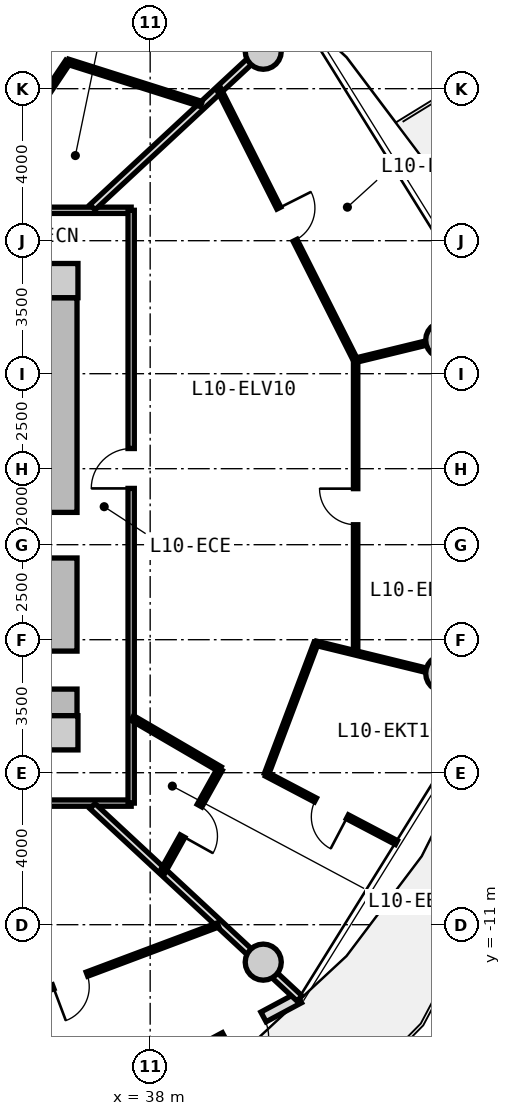
"""IFC4 building model, lengths in metres.
Left out: names, types, materials, properties, quantities, classifications, styles, units other than length and angle.
Written with IfcOpenShell. Run it as: python <this file> out.ifc"""

import sys

from ifc_helpers import new_model, si_unit, direction, frame, frame_2d, origin, origin_2d, place, context, subcontext, project, spatial, rectangle, circle, extrude, source, transform, mapped, element, fill, save


model = new_model("IFC4")
c1 = context("Model", 3, precision=1e-05, world=origin(), true_north=direction((0.0, 1.0)))
c2 = subcontext(c1, "Body", "Model", "MODEL_VIEW")
j1 = project(units=[si_unit("LENGTHUNIT", "METRE"), si_unit("PLANEANGLEUNIT", "RADIAN")], contexts=[c1])
p1 = place(None, origin())
s1 = spatial("IfcSite", under=j1, at=p1, CompositionType="ELEMENT")
p2 = place(p1, origin())
s2 = spatial("IfcBuilding", under=s1, at=p2, CompositionType="ELEMENT")
p3 = place(p2, frame((0.0, 0.0, 36.85)))
s3 = spatial("IfcBuildingStorey", under=s2, at=p3, CompositionType="ELEMENT", Elevation=36.85)
m1 = source(origin(), c2, "Body", "SweptSolid", [
    extrude(rectangle(XDim=0.9, YDim=0.9, at=origin_2d()), origin(), (0.0, 0.0, 1.0), 3.05),
])
for number, where, z_axis, x_axis in (
    (1, (35.65, -5.95, 0.0), (0.0, 0.0, 1.0), (1.0, 0.0, 0.0)),
    (2, (35.65, 5.95, 0.0), (0.0, 0.0, 1.0), (1.0, 0.0, 0.0)),
):
    element("IfcColumn", number, at=place(p3, frame(where, z_axis=z_axis, x_axis=x_axis)), inside=s3, PredefinedType="COLUMN", context=c2, shape_type="MappedRepresentation", body=[
        mapped(m1, transform((0.0, 0.0, 0.0), x_axis=(1.0, 0.0, 0.0), y_axis=(0.0, 1.0, 0.0), z_axis=(0.0, 0.0, 1.0), scale=1.0)),
    ])
m2 = source(origin(), c2, "Body", "SweptSolid", [
    extrude(rectangle(XDim=11.0, YDim=0.85, at=frame_2d((5.5, 0.0))), origin(), (0.0, 0.0, 1.0), 2.79),
])
p4 = place(p3, frame((35.65, 5.5, 0.0), z_axis=(0.0, 0.0, 1.0), x_axis=(0.0, -1.0, 0.0)))
e3 = element("IfcWall", 3, at=p4, inside=s3, PredefinedType="SHEAR", context=c2, shape_type="MappedRepresentation", body=[
    mapped(m2, transform((0.0, 0.0, 0.0), x_axis=(1.0, 0.0, 0.0), y_axis=(0.0, 1.0, 0.0), z_axis=(0.0, 0.0, 1.0), scale=1.0)),
])
p5 = place(p4, frame((5.65, 0.0, 0.0)))
e4 = element("IfcOpeningElement", 4, at=p5, cuts=e3, PredefinedType="OPENING", context=c2, shape_type="SweptSolid", body=[
    extrude(rectangle(XDim=1.2, YDim=2.15, at=frame_2d((0.6, 1.075))), frame((0.0, 0.435, 0.0), z_axis=(0.0, -1.0, 0.0), x_axis=(1.0, 0.0, 0.0)), (0.0, 0.0, 1.0), 0.87),
])
p6 = place(p4, frame((9.3, 0.0, 0.0)))
e5 = element("IfcOpeningElement", 5, at=p6, cuts=e3, PredefinedType="OPENING", context=c2, shape_type="SweptSolid", body=[
    extrude(rectangle(XDim=1.0, YDim=2.1, at=frame_2d((0.5, 1.05))), frame((0.0, 0.435, 0.0), z_axis=(0.0, -1.0, 0.0), x_axis=(1.0, 0.0, 0.0)), (0.0, 0.0, 1.0), 0.87),
])
m3 = source(origin(), c2, "Body", "SweptSolid", [
    extrude(circle(Radius=0.475, at=origin_2d()), origin(), (0.0, 0.0, 1.0), 3.05),
])
for number, where, z_axis, x_axis in (
    (6, (45.725, 4.387, 0.0), (0.0, 0.0, 1.0), (1.0, 0.0, 0.0)),
    (7, (40.975, 11.985, 0.0), (0.0, 0.0, 1.0), (1.0, 0.0, 0.0)),
    (8, (40.975, -11.985, 0.0), (0.0, 0.0, 1.0), (1.0, 0.0, 0.0)),
    (9, (45.725, -4.387, 0.0), (0.0, 0.0, 1.0), (1.0, 0.0, 0.0)),
):
    element("IfcColumn", number, at=place(p3, frame(where, z_axis=z_axis, x_axis=x_axis)), inside=s3, PredefinedType="COLUMN", context=c2, shape_type="MappedRepresentation", body=[
        mapped(m3, transform((0.0, 0.0, 0.0), x_axis=(1.0, 0.0, 0.0), y_axis=(0.0, 1.0, 0.0), z_axis=(0.0, 0.0, 1.0), scale=1.0)),
    ])
m4 = source(origin(), c2, "Body", "SweptSolid", [
    extrude(rectangle(XDim=10.011, YDim=0.29, at=frame_2d((5.005, 0.0))), origin(), (0.0, 0.0, 1.0), 2.79),
])
p7 = place(p3, frame((41.916, -12.926, 0.0), z_axis=(0.0, 0.0, 1.0), x_axis=(-0.881272505317, -0.472608475773, 0.0)))
e10 = element("IfcWall", 10, at=p7, inside=s3, PredefinedType="SOLIDWALL", context=c2, shape_type="MappedRepresentation", body=[
    mapped(m4, transform((0.0, 0.0, 0.0), x_axis=(1.0, 0.0, 0.0), y_axis=(0.0, 1.0, 0.0), z_axis=(0.0, 0.0, 1.0), scale=1.0)),
])
p8 = place(p7, frame((1.06, 0.0, 0.0)))
e11 = element("IfcOpeningElement", 11, at=p8, cuts=e10, PredefinedType="OPENING", context=c2, shape_type="SweptSolid", body=[
    extrude(rectangle(XDim=1.15, YDim=2.25, at=frame_2d((0.575, 1.125))), frame((0.0, 0.155, 0.0), z_axis=(0.0, -1.0, 0.0), x_axis=(1.0, 0.0, 0.0)), (0.0, 0.0, 1.0), 0.31),
])
p9 = place(p7, frame((5.355, 0.0, 0.85)))
e12 = element("IfcOpeningElement", 12, at=p9, cuts=e10, PredefinedType="OPENING", context=c2, shape_type="SweptSolid", body=[
    extrude(rectangle(XDim=1.2, YDim=1.5, at=frame_2d((0.6, 0.75))), frame((0.0, 0.155, 0.0), z_axis=(0.0, -1.0, 0.0), x_axis=(1.0, 0.0, 0.0)), (0.0, 0.0, 1.0), 0.31),
])
m5 = source(origin(), c2, "Body", "SweptSolid", [
    extrude(rectangle(XDim=19.0, YDim=0.165, at=frame_2d((9.5, 0.0))), origin(), (0.0, 0.0, 1.0), 2.775),
])
p10 = place(p3, frame((18.5, 7.8, 0.0), z_axis=(0.0, 0.0, 1.0), x_axis=(1.0, 0.0, 0.0)))
e13 = element("IfcWall", 13, at=p10, inside=s3, PredefinedType="PARTITIONING", context=c2, shape_type="MappedRepresentation", body=[
    mapped(m5, transform((0.0, 0.0, 0.0), x_axis=(1.0, 0.0, 0.0), y_axis=(0.0, 1.0, 0.0), z_axis=(0.0, 0.0, 1.0), scale=1.0)),
])
p11 = place(p10, frame((10.523, 0.0, 0.0)))
e14 = element("IfcOpeningElement", 14, at=p11, cuts=e13, PredefinedType="OPENING", context=c2, shape_type="SweptSolid", body=[
    extrude(rectangle(XDim=0.92, YDim=2.1, at=frame_2d((0.46, 1.05))), frame((0.0, 0.093, 0.0), z_axis=(0.0, -1.0, 0.0), x_axis=(1.0, 0.0, 0.0)), (0.0, 0.0, 1.0), 0.185),
])
p12 = place(p10, frame((8.226, 0.0, 0.0)))
e15 = element("IfcOpeningElement", 15, at=p12, cuts=e13, PredefinedType="OPENING", context=c2, shape_type="SweptSolid", body=[
    extrude(rectangle(XDim=0.92, YDim=2.1, at=frame_2d((0.46, 1.05))), frame((0.0, 0.093, 0.0), z_axis=(0.0, -1.0, 0.0), x_axis=(1.0, 0.0, 0.0)), (0.0, 0.0, 1.0), 0.185),
])
p13 = place(p10, frame((3.506, 0.0, 0.0)))
e16 = element("IfcOpeningElement", 16, at=p13, cuts=e13, PredefinedType="OPENING", context=c2, shape_type="SweptSolid", body=[
    extrude(rectangle(XDim=1.25, YDim=2.2, at=frame_2d((0.625, 1.1))), frame((0.0, 0.093, 0.0), z_axis=(0.0, -1.0, 0.0), x_axis=(1.0, 0.0, 0.0)), (0.0, 0.0, 1.0), 0.185),
])
p14 = place(p10, frame((12.706, 0.0, 0.0)))
e17 = element("IfcOpeningElement", 17, at=p14, cuts=e13, PredefinedType="OPENING", context=c2, shape_type="SweptSolid", body=[
    extrude(rectangle(XDim=1.05, YDim=2.15, at=frame_2d((0.525, 1.075))), frame((0.0, 0.093, 0.0), z_axis=(0.0, -1.0, 0.0), x_axis=(1.0, 0.0, 0.0)), (0.0, 0.0, 1.0), 0.185),
])
p15 = place(p3, frame((37.5, -7.8, 0.0), z_axis=(0.0, 0.0, 1.0), x_axis=(-1.0, 0.0, 0.0)))
e18 = element("IfcWall", 18, at=p15, inside=s3, PredefinedType="PARTITIONING", context=c2, shape_type="MappedRepresentation", body=[
    mapped(m5, transform((0.0, 0.0, 0.0), x_axis=(1.0, 0.0, 0.0), y_axis=(0.0, 1.0, 0.0), z_axis=(0.0, 0.0, 1.0), scale=1.0)),
])
p16 = place(p15, frame((7.336, 0.0, 0.0)))
e19 = element("IfcOpeningElement", 19, at=p16, cuts=e18, PredefinedType="OPENING", context=c2, shape_type="SweptSolid", body=[
    extrude(rectangle(XDim=1.05, YDim=2.15, at=frame_2d((0.525, 1.075))), frame((0.0, 0.093, 0.0), z_axis=(0.0, -1.0, 0.0), x_axis=(1.0, 0.0, 0.0)), (0.0, 0.0, 1.0), 0.185),
])
m6 = source(origin(), c2, "Body", "SweptSolid", [
    extrude(rectangle(XDim=15.6, YDim=0.165, at=frame_2d((7.8, 0.0))), origin(), (0.0, 0.0, 1.0), 2.775),
])
p17 = place(p3, frame((37.5, 7.8, 0.0), z_axis=(0.0, 0.0, 1.0), x_axis=(0.0, -1.0, 0.0)))
e20 = element("IfcWall", 20, at=p17, inside=s3, PredefinedType="PARTITIONING", context=c2, shape_type="MappedRepresentation", body=[
    mapped(m6, transform((0.0, 0.0, 0.0), x_axis=(1.0, 0.0, 0.0), y_axis=(0.0, 1.0, 0.0), z_axis=(0.0, 0.0, 1.0), scale=1.0)),
])
p18 = place(p17, frame((6.269, 0.0, 0.0)))
e21 = element("IfcOpeningElement", 21, at=p18, cuts=e20, PredefinedType="OPENING", context=c2, shape_type="SweptSolid", body=[
    extrude(rectangle(XDim=1.05, YDim=2.15, at=frame_2d((0.525, 1.075))), frame((0.0, 0.093, 0.0), z_axis=(0.0, -1.0, 0.0), x_axis=(1.0, 0.0, 0.0)), (0.0, 0.0, 1.0), 0.185),
])
m7 = source(origin(), c2, "Body", "SweptSolid", [
    extrude(rectangle(XDim=7.435, YDim=0.19, at=frame_2d((3.717, 0.0))), origin(), (0.0, 0.0, 1.0), 2.225),
])
p19 = place(p3, frame((36.483, -7.88, 0.0), z_axis=(0.0, 0.0, 1.0), x_axis=(0.732651956848, -0.680603489652, 0.0)))
e22 = element("IfcWall", 22, at=p19, inside=s3, PredefinedType="PARTITIONING", context=c2, shape_type="MappedRepresentation", body=[
    mapped(m7, transform((0.0, 0.0, 0.0), x_axis=(1.0, 0.0, 0.0), y_axis=(0.0, 1.0, 0.0), z_axis=(0.0, 0.0, 1.0), scale=1.0)),
])
m8 = source(origin(), c2, "Body", "SweptSolid", [
    extrude(rectangle(XDim=8.32, YDim=0.115, at=frame_2d((4.16, 0.0))), origin(), (0.0, 0.0, 1.0), 2.775),
])
p20 = place(p3, frame((31.997, -13.93, 0.0), z_axis=(0.0, 0.0, 1.0), x_axis=(0.936180763098, 0.351518959382, 0.0)))
e23 = element("IfcWall", 23, at=p20, inside=s3, PredefinedType="PARTITIONING", context=c2, shape_type="MappedRepresentation", body=[
    mapped(m8, transform((0.0, 0.0, 0.0), x_axis=(1.0, 0.0, 0.0), y_axis=(0.0, 1.0, 0.0), z_axis=(0.0, 0.0, 1.0), scale=1.0)),
])
p21 = place(p20, frame((3.685, 0.0, 0.0)))
e24 = element("IfcOpeningElement", 24, at=p21, cuts=e23, PredefinedType="OPENING", context=c2, shape_type="SweptSolid", body=[
    extrude(rectangle(XDim=0.95, YDim=2.1, at=frame_2d((0.475, 1.05))), frame((0.0, 0.067, 0.0), z_axis=(0.0, -1.0, 0.0), x_axis=(1.0, 0.0, 0.0)), (0.0, 0.0, 1.0), 0.135),
])
p22 = place(p3, frame((36.483, 7.88, 0.0), z_axis=(0.0, 0.0, 1.0), x_axis=(0.732651956848, 0.680603489652, 0.0)))
e25 = element("IfcWall", 25, at=p22, inside=s3, PredefinedType="PARTITIONING", context=c2, shape_type="MappedRepresentation", body=[
    mapped(m7, transform((0.0, 0.0, 0.0), x_axis=(1.0, 0.0, 0.0), y_axis=(0.0, 1.0, 0.0), z_axis=(0.0, 0.0, 1.0), scale=1.0)),
])
m9 = source(origin(), c2, "Body", "SweptSolid", [
    extrude(rectangle(XDim=7.709, YDim=0.115, at=frame_2d((3.855, 0.0))), origin(), (0.0, 0.0, 1.0), 2.775),
])
p23 = place(p3, frame((43.406, -3.855, 0.0), z_axis=(0.0, 0.0, 1.0), x_axis=(0.0, 1.0, 0.0)))
e26 = element("IfcWall", 26, at=p23, inside=s3, PredefinedType="PARTITIONING", context=c2, shape_type="MappedRepresentation", body=[
    mapped(m9, transform((0.0, 0.0, 0.0), x_axis=(1.0, 0.0, 0.0), y_axis=(0.0, 1.0, 0.0), z_axis=(0.0, 0.0, 1.0), scale=1.0)),
])
p24 = place(p23, frame((3.38, 0.0, 0.0)))
e27 = element("IfcOpeningElement", 27, at=p24, cuts=e26, PredefinedType="OPENING", context=c2, shape_type="SweptSolid", body=[
    extrude(rectangle(XDim=0.95, YDim=2.1, at=frame_2d((0.475, 1.05))), frame((0.0, 0.067, 0.0), z_axis=(0.0, -1.0, 0.0), x_axis=(1.0, 0.0, 0.0)), (0.0, 0.0, 1.0), 0.135),
])
m10 = source(origin(), c2, "Body", "SweptSolid", [
    extrude(rectangle(XDim=4.803, YDim=0.115, at=frame_2d((2.401, 0.0))), origin(), (0.0, 0.0, 1.0), 2.225),
])
p25 = place(p3, frame((42.364, -3.594, 0.0), z_axis=(0.0, 0.0, 1.0), x_axis=(0.97129155908, -0.237892217736, 0.0)))
e28 = element("IfcWall", 28, at=p25, inside=s3, PredefinedType="PARTITIONING", context=c2, shape_type="MappedRepresentation", body=[
    mapped(m10, transform((0.0, 0.0, 0.0), x_axis=(1.0, 0.0, 0.0), y_axis=(0.0, 1.0, 0.0), z_axis=(0.0, 0.0, 1.0), scale=1.0)),
])
m11 = source(origin(), c2, "Body", "SweptSolid", [
    extrude(rectangle(XDim=8.018, YDim=0.115, at=frame_2d((4.009, 0.0))), origin(), (0.0, 0.0, 1.0), 2.775),
])
p26 = place(p3, frame((43.404, 3.854, 0.0), z_axis=(0.0, 0.0, 1.0), x_axis=(-0.450134355233, 0.89296084026, 0.0)))
e29 = element("IfcWall", 29, at=p26, inside=s3, PredefinedType="PARTITIONING", context=c2, shape_type="MappedRepresentation", body=[
    mapped(m11, transform((0.0, 0.0, 0.0), x_axis=(1.0, 0.0, 0.0), y_axis=(0.0, 1.0, 0.0), z_axis=(0.0, 0.0, 1.0), scale=1.0)),
])
p27 = place(p26, frame((3.534, 0.0, 0.0)))
e30 = element("IfcOpeningElement", 30, at=p27, cuts=e29, PredefinedType="OPENING", context=c2, shape_type="SweptSolid", body=[
    extrude(rectangle(XDim=0.95, YDim=2.1, at=frame_2d((0.475, 1.05))), frame((0.0, 0.067, 0.0), z_axis=(0.0, -1.0, 0.0), x_axis=(1.0, 0.0, 0.0)), (0.0, 0.0, 1.0), 0.135),
])
m12 = source(origin(), c2, "Body", "SweptSolid", [
    extrude(rectangle(XDim=3.73, YDim=0.115, at=frame_2d((1.865, 0.0))), origin(), (0.0, 0.0, 1.0), 2.225),
])
p28 = place(p3, frame((43.404, 3.854, 0.0), z_axis=(0.0, 0.0, 1.0), x_axis=(0.971644038568, 0.236448434791, 0.0)))
e31 = element("IfcWall", 31, at=p28, inside=s3, PredefinedType="PARTITIONING", context=c2, shape_type="MappedRepresentation", body=[
    mapped(m12, transform((0.0, 0.0, 0.0), x_axis=(1.0, 0.0, 0.0), y_axis=(0.0, 1.0, 0.0), z_axis=(0.0, 0.0, 1.0), scale=1.0)),
])
m13 = source(origin(), c2, "Body", "SweptSolid", [
    extrude(rectangle(XDim=2.669, YDim=0.14, at=frame_2d((1.335, 0.0))), origin(), (0.0, 0.0, 1.0), 2.775),
])
p29 = place(p3, frame((37.53, -5.561, 0.0), z_axis=(0.0, 0.0, 1.0), x_axis=(0.86369928178, -0.50400749067, 0.0)))
e32 = element("IfcWall", 32, at=p29, inside=s3, PredefinedType="PARTITIONING", context=c2, shape_type="MappedRepresentation", body=[
    mapped(m13, transform((0.0, 0.0, 0.0), x_axis=(1.0, 0.0, 0.0), y_axis=(0.0, 1.0, 0.0), z_axis=(0.0, 0.0, 1.0), scale=1.0)),
])
m14 = source(origin(), c2, "Body", "SweptSolid", [
    extrude(rectangle(XDim=3.121, YDim=0.14, at=frame_2d((1.561, 0.0))), origin(), (0.0, 0.0, 1.0), 2.775),
])
p30 = place(p3, frame((39.836, -6.906, 0.0), z_axis=(0.0, 0.0, 1.0), x_axis=(-0.487302357327, -0.873233309342, 0.0)))
e33 = element("IfcWall", 33, at=p30, inside=s3, PredefinedType="PARTITIONING", context=c2, shape_type="MappedRepresentation", body=[
    mapped(m14, transform((0.0, 0.0, 0.0), x_axis=(1.0, 0.0, 0.0), y_axis=(0.0, 1.0, 0.0), z_axis=(0.0, 0.0, 1.0), scale=1.0)),
])
p31 = place(p30, frame((1.101, 0.0, 0.0)))
e34 = element("IfcOpeningElement", 34, at=p31, cuts=e33, PredefinedType="OPENING", context=c2, shape_type="SweptSolid", body=[
    extrude(rectangle(XDim=0.92, YDim=2.1, at=frame_2d((0.46, 1.05))), frame((0.0, 0.08, 0.0), z_axis=(0.0, -1.0, 0.0), x_axis=(1.0, 0.0, 0.0)), (0.0, 0.0, 1.0), 0.16),
])
m15 = source(origin(), c2, "Body", "SweptSolid", [
    extrude(rectangle(XDim=3.864, YDim=0.115, at=frame_2d((1.932, 0.0))), origin(), (0.0, 0.0, 1.0), 2.775),
])
p32 = place(p3, frame((41.06, -7.041, 0.0), z_axis=(0.0, 0.0, 1.0), x_axis=(0.885194959803, -0.465220252289, 0.0)))
e35 = element("IfcWall", 35, at=p32, inside=s3, PredefinedType="PARTITIONING", context=c2, shape_type="MappedRepresentation", body=[
    mapped(m15, transform((0.0, 0.0, 0.0), x_axis=(1.0, 0.0, 0.0), y_axis=(0.0, 1.0, 0.0), z_axis=(0.0, 0.0, 1.0), scale=1.0)),
])
p33 = place(p32, frame((1.457, 0.0, 0.0)))
e36 = element("IfcOpeningElement", 36, at=p33, cuts=e35, PredefinedType="OPENING", context=c2, shape_type="SweptSolid", body=[
    extrude(rectangle(XDim=0.95, YDim=2.1, at=frame_2d((0.475, 1.05))), frame((0.0, 0.067, 0.0), z_axis=(0.0, -1.0, 0.0), x_axis=(1.0, 0.0, 0.0)), (0.0, 0.0, 1.0), 0.135),
])
m16 = source(origin(), c2, "Body", "SweptSolid", [
    extrude(rectangle(XDim=3.685, YDim=0.115, at=frame_2d((1.843, 0.0))), origin(), (0.0, 0.0, 1.0), 2.775),
])
p34 = place(p3, frame((41.06, -7.041, 0.0), z_axis=(0.0, 0.0, 1.0), x_axis=(0.353503632997, 0.935433151785, 0.0)))
e37 = element("IfcWall", 37, at=p34, inside=s3, PredefinedType="PARTITIONING", context=c2, shape_type="MappedRepresentation", body=[
    mapped(m16, transform((0.0, 0.0, 0.0), x_axis=(1.0, 0.0, 0.0), y_axis=(0.0, 1.0, 0.0), z_axis=(0.0, 0.0, 1.0), scale=1.0)),
])
m17 = source(origin(), c2, "Body", "SweptSolid", [
    extrude(rectangle(XDim=4.668, YDim=0.14, at=frame_2d((2.334, 0.0))), origin(), (0.0, 0.0, 1.0), 2.775),
])
p35 = place(p3, frame((33.24, 7.83, 0.0), z_axis=(0.0, 0.0, 1.0), x_axis=(0.55615986029, 0.83107533341, 0.0)))
e38 = element("IfcWall", 38, at=p35, inside=s3, PredefinedType="PARTITIONING", context=c2, shape_type="MappedRepresentation", body=[
    mapped(m17, transform((0.0, 0.0, 0.0), x_axis=(1.0, 0.0, 0.0), y_axis=(0.0, 1.0, 0.0), z_axis=(0.0, 0.0, 1.0), scale=1.0)),
])
p36 = place(p35, frame((1.874, 0.0, 0.0)))
e39 = element("IfcOpeningElement", 39, at=p36, cuts=e38, PredefinedType="OPENING", context=c2, shape_type="SweptSolid", body=[
    extrude(rectangle(XDim=0.92, YDim=2.1, at=frame_2d((0.46, 1.05))), frame((0.0, 0.08, 0.0), z_axis=(0.0, -1.0, 0.0), x_axis=(1.0, 0.0, 0.0)), (0.0, 0.0, 1.0), 0.16),
])
m18 = source(origin(), c2, "Body", "SweptSolid", [
    extrude(rectangle(XDim=3.684, YDim=0.14, at=frame_2d((1.842, 0.0))), origin(), (0.0, 0.0, 1.0), 2.775),
])
p37 = place(p3, frame((35.836, 11.709, 0.0), z_axis=(0.0, 0.0, 1.0), x_axis=(0.953245538614, -0.302196861518, 0.0)))
e40 = element("IfcWall", 40, at=p37, inside=s3, PredefinedType="PARTITIONING", context=c2, shape_type="MappedRepresentation", body=[
    mapped(m18, transform((0.0, 0.0, 0.0), x_axis=(1.0, 0.0, 0.0), y_axis=(0.0, 1.0, 0.0), z_axis=(0.0, 0.0, 1.0), scale=1.0)),
])
m19 = source(origin(), c2, "Body", "SweptSolid", [
    extrude(rectangle(XDim=1.15, YDim=2.25, at=frame_2d((0.575, 1.125))), frame((0.0, 0.025, 0.0), z_axis=(0.0, -1.0, 0.0), x_axis=(1.0, 0.0, 0.0)), (0.0, 0.0, 1.0), 0.05),
])
p38 = place(p8, origin())
e41 = element("IfcDoor", 41, at=p38, inside=s3, OperationType="SINGLE_SWING_RIGHT", PredefinedType="DOOR", context=c2, shape_type="MappedRepresentation", body=[
    mapped(m19, transform((0.0, 0.0, 0.0), x_axis=(1.0, 0.0, 0.0), y_axis=(0.0, 1.0, 0.0), z_axis=(0.0, 0.0, 1.0), scale=1.0)),
])
fill(e11, e41)
m20 = source(origin(), c2, "Body", "SweptSolid", [
    extrude(rectangle(XDim=1.2, YDim=2.15, at=frame_2d((0.6, 1.075))), frame((0.0, 0.025, 0.0), z_axis=(0.0, -1.0, 0.0), x_axis=(1.0, 0.0, 0.0)), (0.0, 0.0, 1.0), 0.05),
])
p39 = place(p5, frame((1.2, 0.0, 0.0), z_axis=(0.0, 0.0, 1.0), x_axis=(-1.0, 0.0, 0.0)))
e42 = element("IfcDoor", 42, at=p39, inside=s3, OperationType="SINGLE_SWING_RIGHT", PredefinedType="DOOR", context=c2, shape_type="MappedRepresentation", body=[
    mapped(m20, transform((0.0, 0.0, 0.0), x_axis=(1.0, 0.0, 0.0), y_axis=(0.0, 1.0, 0.0), z_axis=(0.0, 0.0, 1.0), scale=1.0)),
])
fill(e4, e42)
m21 = source(origin(), c2, "Body", "SweptSolid", [
    extrude(rectangle(XDim=1.0, YDim=2.1, at=frame_2d((0.5, 1.05))), frame((0.0, 0.025, 0.0), z_axis=(0.0, -1.0, 0.0), x_axis=(1.0, 0.0, 0.0)), (0.0, 0.0, 1.0), 0.05),
])
p40 = place(p6, frame((1.0, 0.0, 0.0), z_axis=(0.0, 0.0, 1.0), x_axis=(-1.0, 0.0, 0.0)))
e43 = element("IfcDoor", 43, at=p40, inside=s3, OperationType="SINGLE_SWING_RIGHT", PredefinedType="DOOR", context=c2, shape_type="MappedRepresentation", body=[
    mapped(m21, transform((0.0, 0.0, 0.0), x_axis=(1.0, 0.0, 0.0), y_axis=(0.0, 1.0, 0.0), z_axis=(0.0, 0.0, 1.0), scale=1.0)),
])
fill(e5, e43)
m22 = source(origin(), c2, "Body", "SweptSolid", [
    extrude(rectangle(XDim=0.95, YDim=2.1, at=frame_2d((0.475, 1.05))), frame((0.0, 0.025, 0.0), z_axis=(0.0, -1.0, 0.0), x_axis=(1.0, 0.0, 0.0)), (0.0, 0.0, 1.0), 0.05),
])
p41 = place(p21, frame((0.95, 0.0, 0.0), z_axis=(0.0, 0.0, 1.0), x_axis=(-1.0, 0.0, 0.0)))
e44 = element("IfcDoor", 44, at=p41, inside=s3, OperationType="SINGLE_SWING_RIGHT", PredefinedType="DOOR", context=c2, shape_type="MappedRepresentation", body=[
    mapped(m22, transform((0.0, 0.0, 0.0), x_axis=(1.0, 0.0, 0.0), y_axis=(0.0, 1.0, 0.0), z_axis=(0.0, 0.0, 1.0), scale=1.0)),
])
fill(e24, e44)
m23 = source(origin(), c2, "Body", "SweptSolid", [
    extrude(rectangle(XDim=1.05, YDim=2.15, at=frame_2d((0.525, 1.075))), frame((0.0, 0.025, 0.0), z_axis=(0.0, -1.0, 0.0), x_axis=(1.0, 0.0, 0.0)), (0.0, 0.0, 1.0), 0.05),
])
p42 = place(p18, frame((1.05, 0.0, 0.0), z_axis=(0.0, 0.0, 1.0), x_axis=(-1.0, 0.0, 0.0)))
e45 = element("IfcDoor", 45, at=p42, inside=s3, OperationType="SINGLE_SWING_LEFT", PredefinedType="DOOR", context=c2, shape_type="MappedRepresentation", body=[
    mapped(m23, transform((0.0, 0.0, 0.0), x_axis=(1.0, 0.0, 0.0), y_axis=(0.0, 1.0, 0.0), z_axis=(0.0, 0.0, 1.0), scale=1.0)),
])
fill(e21, e45)
m24 = source(origin(), c2, "Body", "SweptSolid", [
    extrude(rectangle(XDim=0.92, YDim=2.1, at=frame_2d((0.46, 1.05))), frame((0.0, 0.025, 0.0), z_axis=(0.0, -1.0, 0.0), x_axis=(1.0, 0.0, 0.0)), (0.0, 0.0, 1.0), 0.05),
])
p43 = place(p31, origin())
e46 = element("IfcDoor", 46, at=p43, inside=s3, OperationType="SINGLE_SWING_RIGHT", PredefinedType="DOOR", context=c2, shape_type="MappedRepresentation", body=[
    mapped(m24, transform((0.0, 0.0, 0.0), x_axis=(1.0, 0.0, 0.0), y_axis=(0.0, 1.0, 0.0), z_axis=(0.0, 0.0, 1.0), scale=1.0)),
])
fill(e34, e46)
p44 = place(p33, frame((0.95, 0.0, 0.0), z_axis=(0.0, 0.0, 1.0), x_axis=(-1.0, 0.0, 0.0)))
e47 = element("IfcDoor", 47, at=p44, inside=s3, OperationType="SINGLE_SWING_LEFT", PredefinedType="DOOR", context=c2, shape_type="MappedRepresentation", body=[
    mapped(m22, transform((0.0, 0.0, 0.0), x_axis=(1.0, 0.0, 0.0), y_axis=(0.0, 1.0, 0.0), z_axis=(0.0, 0.0, 1.0), scale=1.0)),
])
fill(e36, e47)
p45 = place(p24, origin())
e48 = element("IfcDoor", 48, at=p45, inside=s3, OperationType="SINGLE_SWING_RIGHT", PredefinedType="DOOR", context=c2, shape_type="MappedRepresentation", body=[
    mapped(m22, transform((0.0, 0.0, 0.0), x_axis=(1.0, 0.0, 0.0), y_axis=(0.0, 1.0, 0.0), z_axis=(0.0, 0.0, 1.0), scale=1.0)),
])
fill(e27, e48)
p46 = place(p27, frame((0.95, 0.0, 0.0), z_axis=(0.0, 0.0, 1.0), x_axis=(-1.0, 0.0, 0.0)))
e49 = element("IfcDoor", 49, at=p46, inside=s3, OperationType="SINGLE_SWING_LEFT", PredefinedType="DOOR", context=c2, shape_type="MappedRepresentation", body=[
    mapped(m22, transform((0.0, 0.0, 0.0), x_axis=(1.0, 0.0, 0.0), y_axis=(0.0, 1.0, 0.0), z_axis=(0.0, 0.0, 1.0), scale=1.0)),
])
fill(e30, e49)
save(model, sys.argv[1])
